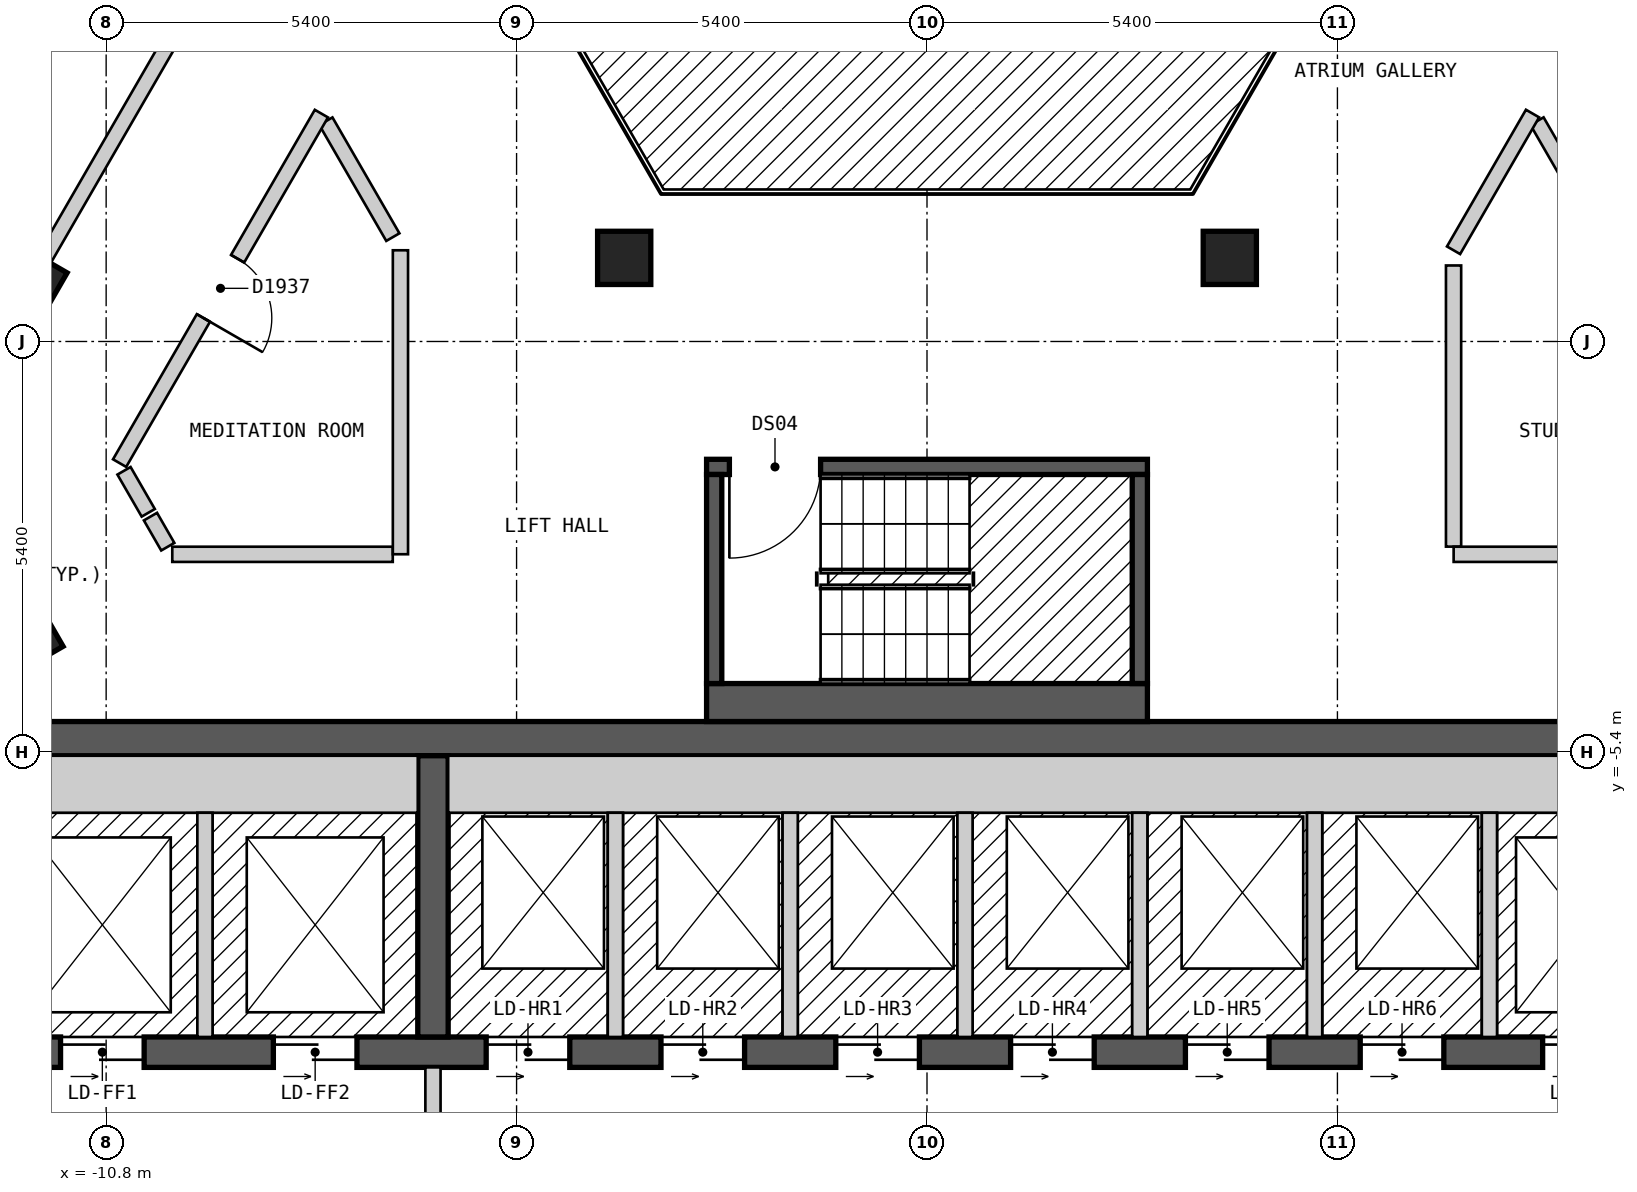
"""IFC4 building model, lengths in metres.
Left out: names, types, materials, properties, quantities, classifications, styles, units other than length and angle.
Written with IfcOpenShell. Run it as: python <this file> out.ifc"""

import sys

from ifc_helpers import new_model, si_unit, direction, frame, frame_2d, origin, origin_2d, place, context, subcontext, project, spatial, rectangle, extrude, element, fill, save


model = new_model("IFC4")
c1 = context("Model", 3, precision=1e-05, world=origin(), true_north=direction((0.0, 1.0)))
c2 = subcontext(c1, "Body", "Model", "MODEL_VIEW")
j1 = project(units=[si_unit("LENGTHUNIT", "METRE"), si_unit("PLANEANGLEUNIT", "RADIAN")], contexts=[c1])
p1 = place(None, origin())
s1 = spatial("IfcSite", under=j1, at=p1, CompositionType="ELEMENT")
p2 = place(p1, origin())
s2 = spatial("IfcBuilding", under=s1, at=p2, CompositionType="ELEMENT")
p3 = place(p2, frame((0.0, 0.0, 226.8)))
s3 = spatial("IfcBuildingStorey", under=s2, at=p3, CompositionType="ELEMENT", Elevation=226.8)
for number, where, z_axis, x_axis in (
    (1, (-11.845, -3.883, 0.0), (0.0, 0.0, 1.0), (0.5, -0.866, 0.0)),
    (2, (3.984, 1.1, 0.0), (0.0, 0.0, 1.0), (1.0, 0.0, 0.0)),
    (3, (-3.984, 1.1, 0.0), (0.0, 0.0, 1.0), (1.0, 0.0, 0.0)),
    (4, (-11.792, 0.775, 0.0), (0.0, 0.0, 1.0), (-0.5, -0.866, 0.0)),
):
    element("IfcColumn", number, at=place(p3, frame(where, z_axis=z_axis, x_axis=x_axis)), inside=s3, PredefinedType="COLUMN", context=c2, shape_type="SweptSolid", body=[
        extrude(rectangle(XDim=0.7, YDim=0.7, at=origin_2d()), origin(), (0.0, 0.0, 1.0), 3.0),
    ])
p4 = place(p3, frame((-13.3, -5.225, 0.0), z_axis=(0.0, 0.0, 1.0), x_axis=(1.0, 0.0, 0.0)))
e5 = element("IfcWall", 5, at=p4, inside=s3, PredefinedType="SHEAR", context=c2, shape_type="SweptSolid", body=[
    extrude(rectangle(XDim=26.6, YDim=0.45, at=frame_2d((13.3, 0.0))), origin(), (0.0, 0.0, 1.0), 2.7),
])
p5 = place(p4, frame((23.65, 0.0, 0.0)))
e6 = element("IfcOpeningElement", 6, at=p5, cuts=e5, PredefinedType="OPENING", context=c2, shape_type="SweptSolid", body=[
    extrude(rectangle(XDim=1.2, YDim=2.1, at=frame_2d((0.6, 1.05))), frame((0.0, 0.235, 0.0), z_axis=(0.0, -1.0, 0.0), x_axis=(1.0, 0.0, 0.0)), (0.0, 0.0, 1.0), 0.47),
])
p6 = place(p3, frame((-12.85, -9.35, 0.0), z_axis=(0.0, 0.0, 1.0), x_axis=(1.0, 0.0, 0.0)))
e7 = element("IfcWall", 7, at=p6, inside=s3, PredefinedType="SHEAR", context=c2, shape_type="SweptSolid", body=[
    extrude(rectangle(XDim=23.05, YDim=0.4, at=frame_2d((11.525, 0.0))), origin(), (0.0, 0.0, 1.0), 2.7),
])
p7 = place(p6, frame((1.45, 0.0, 0.0)))
e8 = element("IfcOpeningElement", 8, at=p7, cuts=e7, PredefinedType="OPENING", context=c2, shape_type="SweptSolid", body=[
    extrude(rectangle(XDim=1.1, YDim=2.1, at=frame_2d((0.55, 1.05))), frame((0.0, 0.21, 0.0), z_axis=(0.0, -1.0, 0.0), x_axis=(1.0, 0.0, 0.0)), (0.0, 0.0, 1.0), 0.42),
])
p8 = place(p6, frame((4.25, 0.0, 0.0)))
e9 = element("IfcOpeningElement", 9, at=p8, cuts=e7, PredefinedType="OPENING", context=c2, shape_type="SweptSolid", body=[
    extrude(rectangle(XDim=1.1, YDim=2.1, at=frame_2d((0.55, 1.05))), frame((0.0, 0.21, 0.0), z_axis=(0.0, -1.0, 0.0), x_axis=(1.0, 0.0, 0.0)), (0.0, 0.0, 1.0), 0.42),
])
p9 = place(p6, frame((7.05, 0.0, 0.0)))
e10 = element("IfcOpeningElement", 10, at=p9, cuts=e7, PredefinedType="OPENING", context=c2, shape_type="SweptSolid", body=[
    extrude(rectangle(XDim=1.1, YDim=2.1, at=frame_2d((0.55, 1.05))), frame((0.0, 0.21, 0.0), z_axis=(0.0, -1.0, 0.0), x_axis=(1.0, 0.0, 0.0)), (0.0, 0.0, 1.0), 0.42),
])
p10 = place(p6, frame((9.35, 0.0, 0.0)))
e11 = element("IfcOpeningElement", 11, at=p10, cuts=e7, PredefinedType="OPENING", context=c2, shape_type="SweptSolid", body=[
    extrude(rectangle(XDim=1.1, YDim=2.1, at=frame_2d((0.55, 1.05))), frame((0.0, 0.21, 0.0), z_axis=(0.0, -1.0, 0.0), x_axis=(1.0, 0.0, 0.0)), (0.0, 0.0, 1.0), 0.42),
])
p11 = place(p6, frame((11.65, 0.0, 0.0)))
e12 = element("IfcOpeningElement", 12, at=p11, cuts=e7, PredefinedType="OPENING", context=c2, shape_type="SweptSolid", body=[
    extrude(rectangle(XDim=1.1, YDim=2.1, at=frame_2d((0.55, 1.05))), frame((0.0, 0.21, 0.0), z_axis=(0.0, -1.0, 0.0), x_axis=(1.0, 0.0, 0.0)), (0.0, 0.0, 1.0), 0.42),
])
p12 = place(p6, frame((13.95, 0.0, 0.0)))
e13 = element("IfcOpeningElement", 13, at=p12, cuts=e7, PredefinedType="OPENING", context=c2, shape_type="SweptSolid", body=[
    extrude(rectangle(XDim=1.1, YDim=2.1, at=frame_2d((0.55, 1.05))), frame((0.0, 0.21, 0.0), z_axis=(0.0, -1.0, 0.0), x_axis=(1.0, 0.0, 0.0)), (0.0, 0.0, 1.0), 0.42),
])
p13 = place(p6, frame((16.25, 0.0, 0.0)))
e14 = element("IfcOpeningElement", 14, at=p13, cuts=e7, PredefinedType="OPENING", context=c2, shape_type="SweptSolid", body=[
    extrude(rectangle(XDim=1.1, YDim=2.1, at=frame_2d((0.55, 1.05))), frame((0.0, 0.21, 0.0), z_axis=(0.0, -1.0, 0.0), x_axis=(1.0, 0.0, 0.0)), (0.0, 0.0, 1.0), 0.42),
])
p14 = place(p6, frame((18.55, 0.0, 0.0)))
e15 = element("IfcOpeningElement", 15, at=p14, cuts=e7, PredefinedType="OPENING", context=c2, shape_type="SweptSolid", body=[
    extrude(rectangle(XDim=1.1, YDim=2.1, at=frame_2d((0.55, 1.05))), frame((0.0, 0.21, 0.0), z_axis=(0.0, -1.0, 0.0), x_axis=(1.0, 0.0, 0.0)), (0.0, 0.0, 1.0), 0.42),
])
p15 = place(p6, frame((20.95, 0.0, 0.0)))
e16 = element("IfcOpeningElement", 16, at=p15, cuts=e7, PredefinedType="OPENING", context=c2, shape_type="SweptSolid", body=[
    extrude(rectangle(XDim=1.1, YDim=2.1, at=frame_2d((0.55, 1.05))), frame((0.0, 0.21, 0.0), z_axis=(0.0, -1.0, 0.0), x_axis=(1.0, 0.0, 0.0)), (0.0, 0.0, 1.0), 0.42),
])
p16 = place(p3, frame((-6.5, -9.15, 0.0), z_axis=(0.0, 0.0, 1.0), x_axis=(0.0, 1.0, 0.0)))
e17 = element("IfcWall", 17, at=p16, inside=s3, PredefinedType="SHEAR", context=c2, shape_type="SweptSolid", body=[
    extrude(rectangle(XDim=3.7, YDim=0.4, at=frame_2d((1.85, 0.0))), origin(), (0.0, 0.0, 1.0), 2.7),
])
p17 = place(p3, frame((-2.9, -4.75, 0.0), z_axis=(0.0, 0.0, 1.0), x_axis=(1.0, 0.0, 0.0)))
e18 = element("IfcWall", 18, at=p17, inside=s3, PredefinedType="SOLIDWALL", context=c2, shape_type="SweptSolid", body=[
    extrude(rectangle(XDim=5.8, YDim=0.5, at=frame_2d((2.9, 0.0))), origin(), (0.0, 0.0, 1.0), 2.7),
])
p18 = place(p3, frame((-2.9, -1.65, 0.0), z_axis=(0.0, 0.0, 1.0), x_axis=(1.0, 0.0, 0.0)))
e19 = element("IfcWall", 19, at=p18, inside=s3, PredefinedType="SOLIDWALL", context=c2, shape_type="SweptSolid", body=[
    extrude(rectangle(XDim=5.8, YDim=0.2, at=frame_2d((2.9, 0.0))), origin(), (0.0, 0.0, 1.0), 2.7),
])
p19 = place(p18, frame((0.3, 0.0, 0.0)))
e20 = element("IfcOpeningElement", 20, at=p19, cuts=e19, PredefinedType="OPENING", context=c2, shape_type="SweptSolid", body=[
    extrude(rectangle(XDim=1.2, YDim=2.1, at=frame_2d((0.6, 1.05))), frame((0.0, 0.11, 0.0), z_axis=(0.0, -1.0, 0.0), x_axis=(1.0, 0.0, 0.0)), (0.0, 0.0, 1.0), 0.22),
])
for number, where, z_axis, x_axis in (
    (21, (-2.8, -4.5, 0.0), (0.0, 0.0, 1.0), (0.0, 1.0, 0.0)),
    (22, (2.8, -4.5, 0.0), (0.0, 0.0, 1.0), (0.0, 1.0, 0.0)),
):
    element("IfcWall", number, at=place(p3, frame(where, z_axis=z_axis, x_axis=x_axis)), inside=s3, PredefinedType="SOLIDWALL", context=c2, shape_type="SweptSolid", body=[
        extrude(rectangle(XDim=2.75, YDim=0.2, at=frame_2d((1.375, 0.0))), origin(), (0.0, 0.0, 1.0), 2.7),
    ])
p20 = place(p3, frame((-7.909, 2.898, 0.0), z_axis=(0.0, 0.0, 1.0), x_axis=(0.50019444547, -0.865913111531, 0.0)))
e23 = element("IfcWall", 23, at=p20, inside=s3, PredefinedType="PARTITIONING", context=c2, shape_type="SweptSolid", body=[
    extrude(rectangle(XDim=1.761, YDim=0.2, at=frame_2d((0.88, 0.0))), origin(), (0.0, 0.0, 1.0), 2.7),
])
p21 = place(p3, frame((-10.565, -1.701, 0.0), z_axis=(0.0, 0.0, 1.0), x_axis=(0.499512735409, -0.866306543416, 0.0)))
e24 = element("IfcWall", 24, at=p21, inside=s3, PredefinedType="PARTITIONING", context=c2, shape_type="SweptSolid", body=[
    extrude(rectangle(XDim=0.638, YDim=0.2, at=frame_2d((0.319, 0.0))), origin(), (0.0, 0.0, 1.0), 2.7),
])
p22 = place(p3, frame((-10.217, -2.304, 0.0), z_axis=(0.0, 0.0, 1.0), x_axis=(0.499013081552, -0.866594452117, 0.0)))
e25 = element("IfcWall", 25, at=p22, inside=s3, PredefinedType="PARTITIONING", context=c2, shape_type="SweptSolid", body=[
    extrude(rectangle(XDim=0.457, YDim=0.2, at=frame_2d((0.229, 0.0))), origin(), (0.0, 0.0, 1.0), 2.7),
])
p23 = place(p3, frame((8.026, 2.899, 0.0), z_axis=(0.0, 0.0, 1.0), x_axis=(0.499986018985, -0.866033475577, 0.0)))
e26 = element("IfcWall", 26, at=p23, inside=s3, PredefinedType="PARTITIONING", context=c2, shape_type="SweptSolid", body=[
    extrude(rectangle(XDim=5.078, YDim=0.2, at=frame_2d((2.539, 0.0))), origin(), (0.0, 0.0, 1.0), 2.7),
])
p24 = place(p23, frame((2.089, 0.0, 0.0)))
e27 = element("IfcOpeningElement", 27, at=p24, cuts=e26, PredefinedType="OPENING", context=c2, shape_type="SweptSolid", body=[
    extrude(rectangle(XDim=0.9, YDim=2.1, at=frame_2d((0.45, 1.05))), frame((0.0, 0.11, 0.0), z_axis=(0.0, -1.0, 0.0), x_axis=(1.0, 0.0, 0.0)), (0.0, 0.0, 1.0), 0.22),
])
p25 = place(p3, frame((6.928, 1.0, 0.0), z_axis=(0.0, 0.0, 1.0), x_axis=(0.0, -1.0, 0.0)))
e28 = element("IfcWall", 28, at=p25, inside=s3, PredefinedType="PARTITIONING", context=c2, shape_type="SweptSolid", body=[
    extrude(rectangle(XDim=3.699, YDim=0.2, at=frame_2d((1.85, 0.0))), origin(), (0.0, 0.0, 1.0), 2.7),
])
p26 = place(p3, frame((-9.93, -2.8, 0.0), z_axis=(0.0, 0.0, 1.0), x_axis=(1.0, 0.0, 0.0)))
e29 = element("IfcWall", 29, at=p26, inside=s3, PredefinedType="PARTITIONING", context=c2, shape_type="SweptSolid", body=[
    extrude(rectangle(XDim=2.901, YDim=0.2, at=frame_2d((1.45, 0.0))), origin(), (0.0, 0.0, 1.0), 2.7),
])
p27 = place(p3, frame((6.929, -2.8, 0.0), z_axis=(0.0, 0.0, 1.0), x_axis=(1.0, 0.0, 0.0)))
e30 = element("IfcWall", 30, at=p27, inside=s3, PredefinedType="PARTITIONING", context=c2, shape_type="SweptSolid", body=[
    extrude(rectangle(XDim=2.885, YDim=0.2, at=frame_2d((1.442, 0.0))), origin(), (0.0, 0.0, 1.0), 2.7),
])
p28 = place(p3, frame((6.928, 1.2, 0.0), z_axis=(0.0, 0.0, 1.0), x_axis=(0.500132712588, 0.865948768577, 0.0)))
e31 = element("IfcWall", 31, at=p28, inside=s3, PredefinedType="PARTITIONING", context=c2, shape_type="SweptSolid", body=[
    extrude(rectangle(XDim=2.078, YDim=0.2, at=frame_2d((1.039, 0.0))), origin(), (0.0, 0.0, 1.0), 2.7),
])
p29 = place(p3, frame((-10.623, -1.6, 0.0), z_axis=(0.0, 0.0, 1.0), x_axis=(0.500040865889, 0.866001808567, 0.0)))
e32 = element("IfcWall", 32, at=p29, inside=s3, PredefinedType="PARTITIONING", context=c2, shape_type="SweptSolid", body=[
    extrude(rectangle(XDim=5.31, YDim=0.2, at=frame_2d((2.655, 0.0))), origin(), (0.0, 0.0, 1.0), 2.7),
])
p30 = place(p29, frame((2.205, 0.0, 0.0)))
e33 = element("IfcOpeningElement", 33, at=p30, cuts=e32, PredefinedType="OPENING", context=c2, shape_type="SweptSolid", body=[
    extrude(rectangle(XDim=0.9, YDim=2.1, at=frame_2d((0.45, 1.05))), frame((0.0, 0.11, 0.0), z_axis=(0.0, -1.0, 0.0), x_axis=(1.0, 0.0, 0.0)), (0.0, 0.0, 1.0), 0.22),
])
p31 = place(p3, frame((-13.106, -1.5, 0.0), z_axis=(0.0, 0.0, 1.0), x_axis=(0.500025705601, 0.86601056214, 0.0)))
e34 = element("IfcWall", 34, at=p31, inside=s3, PredefinedType="PARTITIONING", context=c2, shape_type="SweptSolid", body=[
    extrude(rectangle(XDim=7.735, YDim=0.2, at=frame_2d((3.868, 0.0))), origin(), (0.0, 0.0, 1.0), 2.7),
])
p32 = place(p3, frame((-6.928, -2.799, 0.0), z_axis=(0.0, 0.0, 1.0), x_axis=(0.0, 1.0, 0.0)))
e35 = element("IfcWall", 35, at=p32, inside=s3, PredefinedType="PARTITIONING", context=c2, shape_type="SweptSolid", body=[
    extrude(rectangle(XDim=3.999, YDim=0.2, at=frame_2d((2.0, 0.0))), origin(), (0.0, 0.0, 1.0), 2.7),
])
p33 = place(p3, frame((-12.1, -5.825, 0.0), z_axis=(0.0, 0.0, 1.0), x_axis=(1.0, 0.0, 0.0)))
e36 = element("IfcWall", 36, at=p33, inside=s3, PredefinedType="SOLIDWALL", context=c2, shape_type="SweptSolid", body=[
    extrude(rectangle(XDim=5.4, YDim=0.75, at=frame_2d((2.7, 0.0))), origin(), (0.0, 0.0, 1.0), 2.7),
])
p34 = place(p3, frame((-9.5, -9.15, 0.0), z_axis=(0.0, 0.0, 1.0), x_axis=(0.0, 1.0, 0.0)))
e37 = element("IfcWall", 37, at=p34, inside=s3, PredefinedType="SOLIDWALL", context=c2, shape_type="SweptSolid", body=[
    extrude(rectangle(XDim=2.95, YDim=0.2, at=frame_2d((1.475, 0.0))), origin(), (0.0, 0.0, 1.0), 2.7),
])
p35 = place(p3, frame((-6.5, -14.45, 0.0), z_axis=(0.0, 0.0, 1.0), x_axis=(0.0, 1.0, 0.0)))
e38 = element("IfcWall", 38, at=p35, inside=s3, PredefinedType="PARTITIONING", context=c2, shape_type="SweptSolid", body=[
    extrude(rectangle(XDim=4.9, YDim=0.2, at=frame_2d((2.45, 0.0))), origin(), (0.0, 0.0, 1.0), 2.7),
])
p36 = place(p35, frame((3.15, 0.0, 0.0), z_axis=(0.0, 0.0, 1.0), x_axis=(-1.0, 0.0, 0.0)))
e39 = element("IfcOpeningElement", 39, at=p36, cuts=e38, PredefinedType="OPENING", context=c2, shape_type="SweptSolid", body=[
    extrude(rectangle(XDim=1.4, YDim=2.1, at=frame_2d((0.7, 1.05))), frame((0.0, 0.11, 0.0), z_axis=(0.0, -1.0, 0.0), x_axis=(1.0, 0.0, 0.0)), (0.0, 0.0, 1.0), 0.22),
])
p37 = place(p3, frame((-6.3, -5.825, 0.0), z_axis=(0.0, 0.0, 1.0), x_axis=(1.0, 0.0, 0.0)))
e40 = element("IfcWall", 40, at=p37, inside=s3, PredefinedType="SOLIDWALL", context=c2, shape_type="SweptSolid", body=[
    extrude(rectangle(XDim=16.1, YDim=0.75, at=frame_2d((8.05, 0.0))), origin(), (0.0, 0.0, 1.0), 2.7),
])
for number, where, z_axis, x_axis in (
    (41, (-4.1, -9.15, 0.0), (0.0, 0.0, 1.0), (0.0, 1.0, 0.0)),
    (42, (-1.8, -9.15, 0.0), (0.0, 0.0, 1.0), (0.0, 1.0, 0.0)),
    (43, (0.5, -9.15, 0.0), (0.0, 0.0, 1.0), (0.0, 1.0, 0.0)),
    (44, (2.8, -9.15, 0.0), (0.0, 0.0, 1.0), (0.0, 1.0, 0.0)),
    (45, (5.1, -9.15, 0.0), (0.0, 0.0, 1.0), (0.0, 1.0, 0.0)),
    (46, (7.4, -9.15, 0.0), (0.0, 0.0, 1.0), (0.0, 1.0, 0.0)),
):
    element("IfcWall", number, at=place(p3, frame(where, z_axis=z_axis, x_axis=x_axis)), inside=s3, PredefinedType="SOLIDWALL", context=c2, shape_type="SweptSolid", body=[
        extrude(rectangle(XDim=2.95, YDim=0.2, at=frame_2d((1.475, 0.0))), origin(), (0.0, 0.0, 1.0), 2.7),
    ])
p38 = place(p19, origin())
e47 = element("IfcDoor", 47, at=p38, inside=s3, OperationType="SINGLE_SWING_LEFT", PredefinedType="DOOR", context=c2, shape_type="SweptSolid", body=[
    extrude(rectangle(XDim=1.2, YDim=2.1, at=frame_2d((0.6, 1.05))), frame((0.0, 0.025, 0.0), z_axis=(0.0, -1.0, 0.0), x_axis=(1.0, 0.0, 0.0)), (0.0, 0.0, 1.0), 0.05),
])
fill(e20, e47)
p39 = place(p30, origin())
e48 = element("IfcDoor", 48, at=p39, inside=s3, OperationType="SINGLE_SWING_LEFT", PredefinedType="DOOR", context=c2, shape_type="SweptSolid", body=[
    extrude(rectangle(XDim=0.9, YDim=2.1, at=frame_2d((0.45, 1.05))), frame((0.0, 0.025, 0.0), z_axis=(0.0, -1.0, 0.0), x_axis=(1.0, 0.0, 0.0)), (0.0, 0.0, 1.0), 0.05),
])
fill(e33, e48)
p40 = place(p7, origin())
e49 = element("IfcDoor", 49, at=p40, inside=s3, OperationType="DOUBLE_DOOR_SLIDING", PredefinedType="DOOR", context=c2, shape_type="SweptSolid", body=[
    extrude(rectangle(XDim=1.1, YDim=2.1, at=frame_2d((0.55, 1.05))), frame((0.0, 0.025, 0.0), z_axis=(0.0, -1.0, 0.0), x_axis=(1.0, 0.0, 0.0)), (0.0, 0.0, 1.0), 0.05),
])
fill(e8, e49)
p41 = place(p8, origin())
e50 = element("IfcDoor", 50, at=p41, inside=s3, OperationType="DOUBLE_DOOR_SLIDING", PredefinedType="DOOR", context=c2, shape_type="SweptSolid", body=[
    extrude(rectangle(XDim=1.1, YDim=2.1, at=frame_2d((0.55, 1.05))), frame((0.0, 0.025, 0.0), z_axis=(0.0, -1.0, 0.0), x_axis=(1.0, 0.0, 0.0)), (0.0, 0.0, 1.0), 0.05),
])
fill(e9, e50)
p42 = place(p9, origin())
e51 = element("IfcDoor", 51, at=p42, inside=s3, OperationType="DOUBLE_DOOR_SLIDING", PredefinedType="DOOR", context=c2, shape_type="SweptSolid", body=[
    extrude(rectangle(XDim=1.1, YDim=2.1, at=frame_2d((0.55, 1.05))), frame((0.0, 0.025, 0.0), z_axis=(0.0, -1.0, 0.0), x_axis=(1.0, 0.0, 0.0)), (0.0, 0.0, 1.0), 0.05),
])
fill(e10, e51)
p43 = place(p10, origin())
e52 = element("IfcDoor", 52, at=p43, inside=s3, OperationType="DOUBLE_DOOR_SLIDING", PredefinedType="DOOR", context=c2, shape_type="SweptSolid", body=[
    extrude(rectangle(XDim=1.1, YDim=2.1, at=frame_2d((0.55, 1.05))), frame((0.0, 0.025, 0.0), z_axis=(0.0, -1.0, 0.0), x_axis=(1.0, 0.0, 0.0)), (0.0, 0.0, 1.0), 0.05),
])
fill(e11, e52)
p44 = place(p11, origin())
e53 = element("IfcDoor", 53, at=p44, inside=s3, OperationType="DOUBLE_DOOR_SLIDING", PredefinedType="DOOR", context=c2, shape_type="SweptSolid", body=[
    extrude(rectangle(XDim=1.1, YDim=2.1, at=frame_2d((0.55, 1.05))), frame((0.0, 0.025, 0.0), z_axis=(0.0, -1.0, 0.0), x_axis=(1.0, 0.0, 0.0)), (0.0, 0.0, 1.0), 0.05),
])
fill(e12, e53)
p45 = place(p12, origin())
e54 = element("IfcDoor", 54, at=p45, inside=s3, OperationType="DOUBLE_DOOR_SLIDING", PredefinedType="DOOR", context=c2, shape_type="SweptSolid", body=[
    extrude(rectangle(XDim=1.1, YDim=2.1, at=frame_2d((0.55, 1.05))), frame((0.0, 0.025, 0.0), z_axis=(0.0, -1.0, 0.0), x_axis=(1.0, 0.0, 0.0)), (0.0, 0.0, 1.0), 0.05),
])
fill(e13, e54)
p46 = place(p13, origin())
e55 = element("IfcDoor", 55, at=p46, inside=s3, OperationType="DOUBLE_DOOR_SLIDING", PredefinedType="DOOR", context=c2, shape_type="SweptSolid", body=[
    extrude(rectangle(XDim=1.1, YDim=2.1, at=frame_2d((0.55, 1.05))), frame((0.0, 0.025, 0.0), z_axis=(0.0, -1.0, 0.0), x_axis=(1.0, 0.0, 0.0)), (0.0, 0.0, 1.0), 0.05),
])
fill(e14, e55)
p47 = place(p14, origin())
e56 = element("IfcDoor", 56, at=p47, inside=s3, OperationType="DOUBLE_DOOR_SLIDING", PredefinedType="DOOR", context=c2, shape_type="SweptSolid", body=[
    extrude(rectangle(XDim=1.1, YDim=2.1, at=frame_2d((0.55, 1.05))), frame((0.0, 0.025, 0.0), z_axis=(0.0, -1.0, 0.0), x_axis=(1.0, 0.0, 0.0)), (0.0, 0.0, 1.0), 0.05),
])
fill(e15, e56)
p48 = place(p15, origin())
e57 = element("IfcDoor", 57, at=p48, inside=s3, OperationType="DOUBLE_DOOR_SLIDING", PredefinedType="DOOR", context=c2, shape_type="SweptSolid", body=[
    extrude(rectangle(XDim=1.1, YDim=2.1, at=frame_2d((0.55, 1.05))), frame((0.0, 0.025, 0.0), z_axis=(0.0, -1.0, 0.0), x_axis=(1.0, 0.0, 0.0)), (0.0, 0.0, 1.0), 0.05),
])
fill(e16, e57)
save(model, sys.argv[1])
